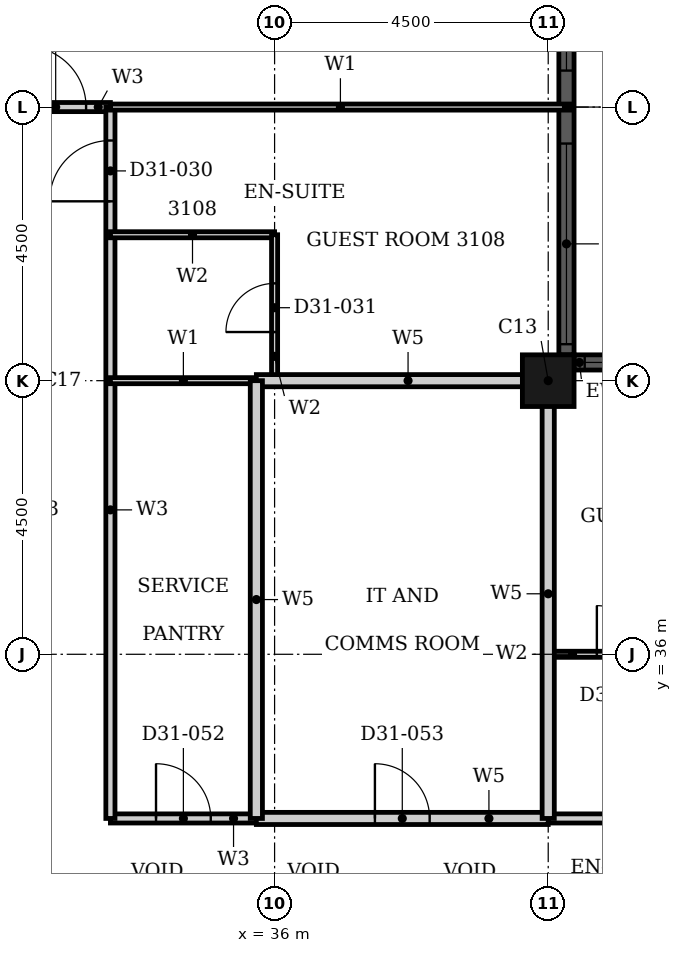
"""IFC4 building model, lengths in metres.
Left out: names, types, materials, properties, quantities, classifications, styles, units other than length and angle.
Written with IfcOpenShell. Run it as: python <this file> out.ifc"""

import sys

from ifc_helpers import new_model, si_unit, direction, frame, frame_2d, origin, origin_2d, place, context, subcontext, project, spatial, rectangle, hollow_rectangle, extrude, element, fill, save


model = new_model("IFC4")
c1 = context("Model", 3, precision=1e-05, world=origin(), true_north=direction((0.0, 1.0)))
c2 = subcontext(c1, "Body", "Model", "MODEL_VIEW")
j1 = project(units=[si_unit("LENGTHUNIT", "METRE"), si_unit("PLANEANGLEUNIT", "RADIAN")], contexts=[c1])
p1 = place(None, origin())
s1 = spatial("IfcSite", under=j1, at=p1, CompositionType="ELEMENT")
p2 = place(p1, origin())
s2 = spatial("IfcBuilding", under=s1, at=p2, CompositionType="ELEMENT")
p3 = place(p2, frame((0.0, 0.0, 126.0)))
s3 = spatial("IfcBuildingStorey", under=s2, at=p3, CompositionType="ELEMENT", Elevation=126.0)
p4 = place(p3, frame((40.5, 40.5, 0.0), z_axis=(0.0, 0.0, 1.0), x_axis=(1.0, 0.0, 0.0)))
e1 = element("IfcColumn", 1, at=p4, inside=s3, PredefinedType="COLUMN", context=c2, shape_type="SweptSolid", body=[
    extrude(hollow_rectangle(XDim=0.85, YDim=0.85, WallThickness=0.026, at=origin_2d()), origin(), (0.0, 0.0, 1.0), 3.6),
])
p5 = place(p3, frame((44.575, 40.8, 0.0), z_axis=(0.0, 0.0, 1.0), x_axis=(-1.0, 0.0, 0.0)))
e2 = element("IfcWall", 2, at=p5, inside=s3, PredefinedType="SOLIDWALL", context=c2, shape_type="SweptSolid", body=[
    extrude(rectangle(XDim=3.65, YDim=0.25, at=frame_2d((1.825, 0.0))), origin(), (0.0, 0.0, 1.0), 3.6),
])
p6 = place(p5, frame((0.175, 0.0, 0.9)))
e3 = element("IfcOpeningElement", 3, at=p6, cuts=e2, PredefinedType="OPENING", context=c2, shape_type="SweptSolid", body=[
    extrude(rectangle(XDim=3.3, YDim=2.08, at=frame_2d((1.65, 1.04))), frame((0.0, 0.135, 0.0), z_axis=(0.0, -1.0, 0.0), x_axis=(1.0, 0.0, 0.0)), (0.0, 0.0, 1.0), 0.27),
])
p7 = place(p3, frame((40.8, 40.925, 0.0), z_axis=(0.0, 0.0, 1.0), x_axis=(0.0, 1.0, 0.0)))
e4 = element("IfcWall", 4, at=p7, inside=s3, PredefinedType="SOLIDWALL", context=c2, shape_type="SweptSolid", body=[
    extrude(rectangle(XDim=8.15, YDim=0.25, at=frame_2d((4.075, 0.0))), origin(), (0.0, 0.0, 1.0), 3.6),
])
p8 = place(p7, frame((0.175, 0.0, 0.9)))
e5 = element("IfcOpeningElement", 5, at=p8, cuts=e4, PredefinedType="OPENING", context=c2, shape_type="SweptSolid", body=[
    extrude(rectangle(XDim=3.3, YDim=2.08, at=frame_2d((1.65, 1.04))), frame((0.0, 0.135, 0.0), z_axis=(0.0, -1.0, 0.0), x_axis=(1.0, 0.0, 0.0)), (0.0, 0.0, 1.0), 0.27),
])
p9 = place(p7, frame((4.675, 0.0, 0.9)))
e6 = element("IfcOpeningElement", 6, at=p9, cuts=e4, PredefinedType="OPENING", context=c2, shape_type="SweptSolid", body=[
    extrude(rectangle(XDim=3.3, YDim=2.08, at=frame_2d((1.65, 1.04))), frame((0.0, 0.135, 0.0), z_axis=(0.0, -1.0, 0.0), x_axis=(1.0, 0.0, 0.0)), (0.0, 0.0, 1.0), 0.27),
])
p10 = place(p3, frame((40.5, 33.3, 0.0), z_axis=(0.0, 0.0, 1.0), x_axis=(1.0, 0.0, 0.0)))
e7 = element("IfcWall", 7, at=p10, inside=s3, PredefinedType="PARTITIONING", context=c2, shape_type="SweptSolid", body=[
    extrude(rectangle(XDim=6.3, YDim=0.15, at=frame_2d((3.15, 0.0))), origin(), (0.0, 0.0, 1.0), 3.3),
])
p11 = place(p10, frame((2.95, 0.0, 0.0)))
e8 = element("IfcOpeningElement", 8, at=p11, cuts=e7, PredefinedType="OPENING", context=c2, shape_type="SweptSolid", body=[
    extrude(rectangle(XDim=1.0, YDim=2.1, at=frame_2d((0.5, 1.05))), frame((0.0, 0.085, 0.0), z_axis=(0.0, -1.0, 0.0), x_axis=(1.0, 0.0, 0.0)), (0.0, 0.0, 1.0), 0.17),
])
p12 = place(p10, frame((4.95, 0.0, 0.0)))
e9 = element("IfcOpeningElement", 9, at=p12, cuts=e7, PredefinedType="OPENING", context=c2, shape_type="SweptSolid", body=[
    extrude(rectangle(XDim=0.9, YDim=2.1, at=frame_2d((0.45, 1.05))), frame((0.0, 0.085, 0.0), z_axis=(0.0, -1.0, 0.0), x_axis=(1.0, 0.0, 0.0)), (0.0, 0.0, 1.0), 0.17),
])
p13 = place(p3, frame((33.3, 33.3, 0.0), z_axis=(0.0, 0.0, 1.0), x_axis=(1.0, 0.0, 0.0)))
e10 = element("IfcWall", 10, at=p13, inside=s3, PredefinedType="PARTITIONING", context=c2, shape_type="SweptSolid", body=[
    extrude(rectangle(XDim=2.4, YDim=0.15, at=frame_2d((1.2, 0.0))), origin(), (0.0, 0.0, 1.0), 3.3),
])
p14 = place(p13, frame((0.75, 0.0, 0.0)))
e11 = element("IfcOpeningElement", 11, at=p14, cuts=e10, PredefinedType="OPENING", context=c2, shape_type="SweptSolid", body=[
    extrude(rectangle(XDim=0.9, YDim=2.1, at=frame_2d((0.45, 1.05))), frame((0.0, 0.085, 0.0), z_axis=(0.0, -1.0, 0.0), x_axis=(1.0, 0.0, 0.0)), (0.0, 0.0, 1.0), 0.17),
])
p15 = place(p3, frame((31.5, 45.0, 0.0), z_axis=(0.0, 0.0, 1.0), x_axis=(1.0, 0.0, 0.0)))
e12 = element("IfcWall", 12, at=p15, inside=s3, PredefinedType="PARTITIONING", context=c2, shape_type="SweptSolid", body=[
    extrude(rectangle(XDim=1.8, YDim=0.15, at=frame_2d((0.9, 0.0))), origin(), (0.0, 0.0, 1.0), 3.3),
])
p16 = place(p15, frame((0.4, 0.0, 0.0)))
e13 = element("IfcOpeningElement", 13, at=p16, cuts=e12, PredefinedType="OPENING", context=c2, shape_type="SweptSolid", body=[
    extrude(rectangle(XDim=1.0, YDim=2.1, at=frame_2d((0.5, 1.05))), frame((0.0, 0.085, 0.0), z_axis=(0.0, -1.0, 0.0), x_axis=(1.0, 0.0, 0.0)), (0.0, 0.0, 1.0), 0.17),
])
p17 = place(p3, frame((33.3, 33.3, 0.0), z_axis=(0.0, 0.0, 1.0), x_axis=(0.0, 1.0, 0.0)))
e14 = element("IfcWall", 14, at=p17, inside=s3, PredefinedType="PARTITIONING", context=c2, shape_type="SweptSolid", body=[
    extrude(rectangle(XDim=11.7, YDim=0.15, at=frame_2d((5.85, 0.0))), origin(), (0.0, 0.0, 1.0), 3.3),
])
p18 = place(p17, frame((10.15, 0.0, 0.0)))
e15 = element("IfcOpeningElement", 15, at=p18, cuts=e14, PredefinedType="OPENING", context=c2, shape_type="SweptSolid", body=[
    extrude(rectangle(XDim=1.0, YDim=2.1, at=frame_2d((0.5, 1.05))), frame((0.0, 0.085, 0.0), z_axis=(0.0, -1.0, 0.0), x_axis=(1.0, 0.0, 0.0)), (0.0, 0.0, 1.0), 0.17),
])
p19 = place(p3, frame((33.3, 40.5, 0.0), z_axis=(0.0, 0.0, 1.0), x_axis=(1.0, 0.0, 0.0)))
e16 = element("IfcWall", 16, at=p19, inside=s3, PredefinedType="PARTITIONING", context=c2, shape_type="SweptSolid", body=[
    extrude(rectangle(XDim=2.4, YDim=0.1, at=frame_2d((1.2, 0.0))), origin(), (0.0, 0.0, 1.0), 2.38),
])
p20 = place(p3, frame((33.3, 45.0, 0.0), z_axis=(0.0, 0.0, 1.0), x_axis=(1.0, 0.0, 0.0)))
e17 = element("IfcWall", 17, at=p20, inside=s3, PredefinedType="PARTITIONING", context=c2, shape_type="SweptSolid", body=[
    extrude(rectangle(XDim=7.565, YDim=0.1, at=frame_2d((3.782, 0.0))), origin(), (0.0, 0.0, 1.0), 3.3),
])
p21 = place(p3, frame((40.5, 36.0, 0.0), z_axis=(0.0, 0.0, 1.0), x_axis=(1.0, 0.0, 0.0)))
e18 = element("IfcWall", 18, at=p21, inside=s3, PredefinedType="PARTITIONING", context=c2, shape_type="SweptSolid", body=[
    extrude(rectangle(XDim=2.4, YDim=0.1, at=frame_2d((1.2, 0.0))), origin(), (0.0, 0.0, 1.0), 3.3),
])
p22 = place(p21, frame((0.8, 0.0, 0.0)))
e19 = element("IfcOpeningElement", 19, at=p22, cuts=e18, PredefinedType="OPENING", context=c2, shape_type="SweptSolid", body=[
    extrude(rectangle(XDim=0.8, YDim=2.1, at=frame_2d((0.4, 1.05))), frame((0.0, 0.06, 0.0), z_axis=(0.0, -1.0, 0.0), x_axis=(1.0, 0.0, 0.0)), (0.0, 0.0, 1.0), 0.12),
])
p23 = place(p3, frame((33.3, 42.9, 0.0), z_axis=(0.0, 0.0, 1.0), x_axis=(1.0, 0.0, 0.0)))
e20 = element("IfcWall", 20, at=p23, inside=s3, PredefinedType="PARTITIONING", context=c2, shape_type="SweptSolid", body=[
    extrude(rectangle(XDim=2.7, YDim=0.1, at=frame_2d((1.35, 0.0))), origin(), (0.0, 0.0, 1.0), 3.3),
])
p24 = place(p3, frame((36.0, 40.5, 0.0), z_axis=(0.0, 0.0, 1.0), x_axis=(0.0, 1.0, 0.0)))
e21 = element("IfcWall", 21, at=p24, inside=s3, PredefinedType="PARTITIONING", context=c2, shape_type="SweptSolid", body=[
    extrude(rectangle(XDim=2.4, YDim=0.1, at=frame_2d((1.2, 0.0))), origin(), (0.0, 0.0, 1.0), 2.58),
])
p25 = place(p24, frame((0.8, 0.0, 0.0)))
e22 = element("IfcOpeningElement", 22, at=p25, cuts=e21, PredefinedType="OPENING", context=c2, shape_type="SweptSolid", body=[
    extrude(rectangle(XDim=0.8, YDim=2.1, at=frame_2d((0.4, 1.05))), frame((0.0, 0.06, 0.0), z_axis=(0.0, -1.0, 0.0), x_axis=(1.0, 0.0, 0.0)), (0.0, 0.0, 1.0), 0.12),
])
p26 = place(p3, frame((35.7, 33.3, 0.0), z_axis=(0.0, 0.0, 1.0), x_axis=(1.0, 0.0, 0.0)))
e23 = element("IfcWall", 23, at=p26, inside=s3, PredefinedType="PARTITIONING", context=c2, shape_type="SweptSolid", body=[
    extrude(rectangle(XDim=4.8, YDim=0.2, at=frame_2d((2.4, 0.0))), origin(), (0.0, 0.0, 1.0), 3.3),
])
p27 = place(p26, frame((1.95, 0.0, 0.0)))
e24 = element("IfcOpeningElement", 24, at=p27, cuts=e23, PredefinedType="OPENING", context=c2, shape_type="SweptSolid", body=[
    extrude(rectangle(XDim=0.9, YDim=2.1, at=frame_2d((0.45, 1.05))), frame((0.0, 0.11, 0.0), z_axis=(0.0, -1.0, 0.0), x_axis=(1.0, 0.0, 0.0)), (0.0, 0.0, 1.0), 0.22),
])
p28 = place(p3, frame((35.7, 40.5, 0.0), z_axis=(0.0, 0.0, 1.0), x_axis=(1.0, 0.0, 0.0)))
e25 = element("IfcWall", 25, at=p28, inside=s3, PredefinedType="PARTITIONING", context=c2, shape_type="SweptSolid", body=[
    extrude(rectangle(XDim=4.99, YDim=0.2, at=frame_2d((2.495, 0.0))), origin(), (0.0, 0.0, 1.0), 2.38),
])
p29 = place(p3, frame((35.7, 33.3, 0.0), z_axis=(0.0, 0.0, 1.0), x_axis=(0.0, 1.0, 0.0)))
e26 = element("IfcWall", 26, at=p29, inside=s3, PredefinedType="PARTITIONING", context=c2, shape_type="SweptSolid", body=[
    extrude(rectangle(XDim=7.2, YDim=0.2, at=frame_2d((3.6, 0.0))), origin(), (0.0, 0.0, 1.0), 3.3),
])
p30 = place(p3, frame((40.5, 33.3, 0.0), z_axis=(0.0, 0.0, 1.0), x_axis=(0.0, 1.0, 0.0)))
e27 = element("IfcWall", 27, at=p30, inside=s3, PredefinedType="PARTITIONING", context=c2, shape_type="SweptSolid", body=[
    extrude(rectangle(XDim=7.39, YDim=0.2, at=frame_2d((3.695, 0.0))), origin(), (0.0, 0.0, 1.0), 3.3),
])
p31 = place(p6, origin())
e28 = element("IfcWindow", 28, at=p31, inside=s3, PartitioningType="SINGLE_PANEL", PredefinedType="WINDOW", context=c2, shape_type="SweptSolid", body=[
    extrude(rectangle(XDim=3.3, YDim=2.08, at=frame_2d((1.65, 1.04))), frame((0.0, 0.03, 0.0), z_axis=(0.0, -1.0, 0.0), x_axis=(1.0, 0.0, 0.0)), (0.0, 0.0, 1.0), 0.06),
])
fill(e3, e28)
p32 = place(p8, origin())
e29 = element("IfcWindow", 29, at=p32, inside=s3, PartitioningType="SINGLE_PANEL", PredefinedType="WINDOW", context=c2, shape_type="SweptSolid", body=[
    extrude(rectangle(XDim=3.3, YDim=2.08, at=frame_2d((1.65, 1.04))), frame((0.0, 0.03, 0.0), z_axis=(0.0, -1.0, 0.0), x_axis=(1.0, 0.0, 0.0)), (0.0, 0.0, 1.0), 0.06),
])
fill(e5, e29)
p33 = place(p9, origin())
e30 = element("IfcWindow", 30, at=p33, inside=s3, PartitioningType="SINGLE_PANEL", PredefinedType="WINDOW", context=c2, shape_type="SweptSolid", body=[
    extrude(rectangle(XDim=3.3, YDim=2.08, at=frame_2d((1.65, 1.04))), frame((0.0, 0.03, 0.0), z_axis=(0.0, -1.0, 0.0), x_axis=(1.0, 0.0, 0.0)), (0.0, 0.0, 1.0), 0.06),
])
fill(e6, e30)
p34 = place(p18, origin())
e31 = element("IfcDoor", 31, at=p34, inside=s3, OperationType="SINGLE_SWING_RIGHT", PredefinedType="DOOR", context=c2, shape_type="SweptSolid", body=[
    extrude(rectangle(XDim=1.0, YDim=2.1, at=frame_2d((0.5, 1.05))), frame((0.0, 0.025, 0.0), z_axis=(0.0, -1.0, 0.0), x_axis=(1.0, 0.0, 0.0)), (0.0, 0.0, 1.0), 0.05),
])
fill(e15, e31)
p35 = place(p25, origin())
e32 = element("IfcDoor", 32, at=p35, inside=s3, OperationType="SINGLE_SWING_LEFT", PredefinedType="DOOR", context=c2, shape_type="SweptSolid", body=[
    extrude(rectangle(XDim=0.8, YDim=2.1, at=frame_2d((0.4, 1.05))), frame((0.0, 0.025, 0.0), z_axis=(0.0, -1.0, 0.0), x_axis=(1.0, 0.0, 0.0)), (0.0, 0.0, 1.0), 0.05),
])
fill(e22, e32)
p36 = place(p16, origin())
e33 = element("IfcDoor", 33, at=p36, inside=s3, OperationType="SINGLE_SWING_RIGHT", PredefinedType="DOOR", context=c2, shape_type="SweptSolid", body=[
    extrude(rectangle(XDim=1.0, YDim=2.1, at=frame_2d((0.5, 1.05))), frame((0.0, 0.025, 0.0), z_axis=(0.0, -1.0, 0.0), x_axis=(1.0, 0.0, 0.0)), (0.0, 0.0, 1.0), 0.05),
])
fill(e13, e33)
p37 = place(p22, origin())
e34 = element("IfcDoor", 34, at=p37, inside=s3, OperationType="SINGLE_SWING_LEFT", PredefinedType="DOOR", context=c2, shape_type="SweptSolid", body=[
    extrude(rectangle(XDim=0.8, YDim=2.1, at=frame_2d((0.4, 1.05))), frame((0.0, 0.025, 0.0), z_axis=(0.0, -1.0, 0.0), x_axis=(1.0, 0.0, 0.0)), (0.0, 0.0, 1.0), 0.05),
])
fill(e19, e34)
p38 = place(p14, origin())
e35 = element("IfcDoor", 35, at=p38, inside=s3, OperationType="SINGLE_SWING_LEFT", PredefinedType="DOOR", context=c2, shape_type="SweptSolid", body=[
    extrude(rectangle(XDim=0.9, YDim=2.1, at=frame_2d((0.45, 1.05))), frame((0.0, 0.025, 0.0), z_axis=(0.0, -1.0, 0.0), x_axis=(1.0, 0.0, 0.0)), (0.0, 0.0, 1.0), 0.05),
])
fill(e11, e35)
p39 = place(p27, origin())
e36 = element("IfcDoor", 36, at=p39, inside=s3, OperationType="SINGLE_SWING_LEFT", PredefinedType="DOOR", context=c2, shape_type="SweptSolid", body=[
    extrude(rectangle(XDim=0.9, YDim=2.1, at=frame_2d((0.45, 1.05))), frame((0.0, 0.025, 0.0), z_axis=(0.0, -1.0, 0.0), x_axis=(1.0, 0.0, 0.0)), (0.0, 0.0, 1.0), 0.05),
])
fill(e24, e36)
save(model, sys.argv[1])
